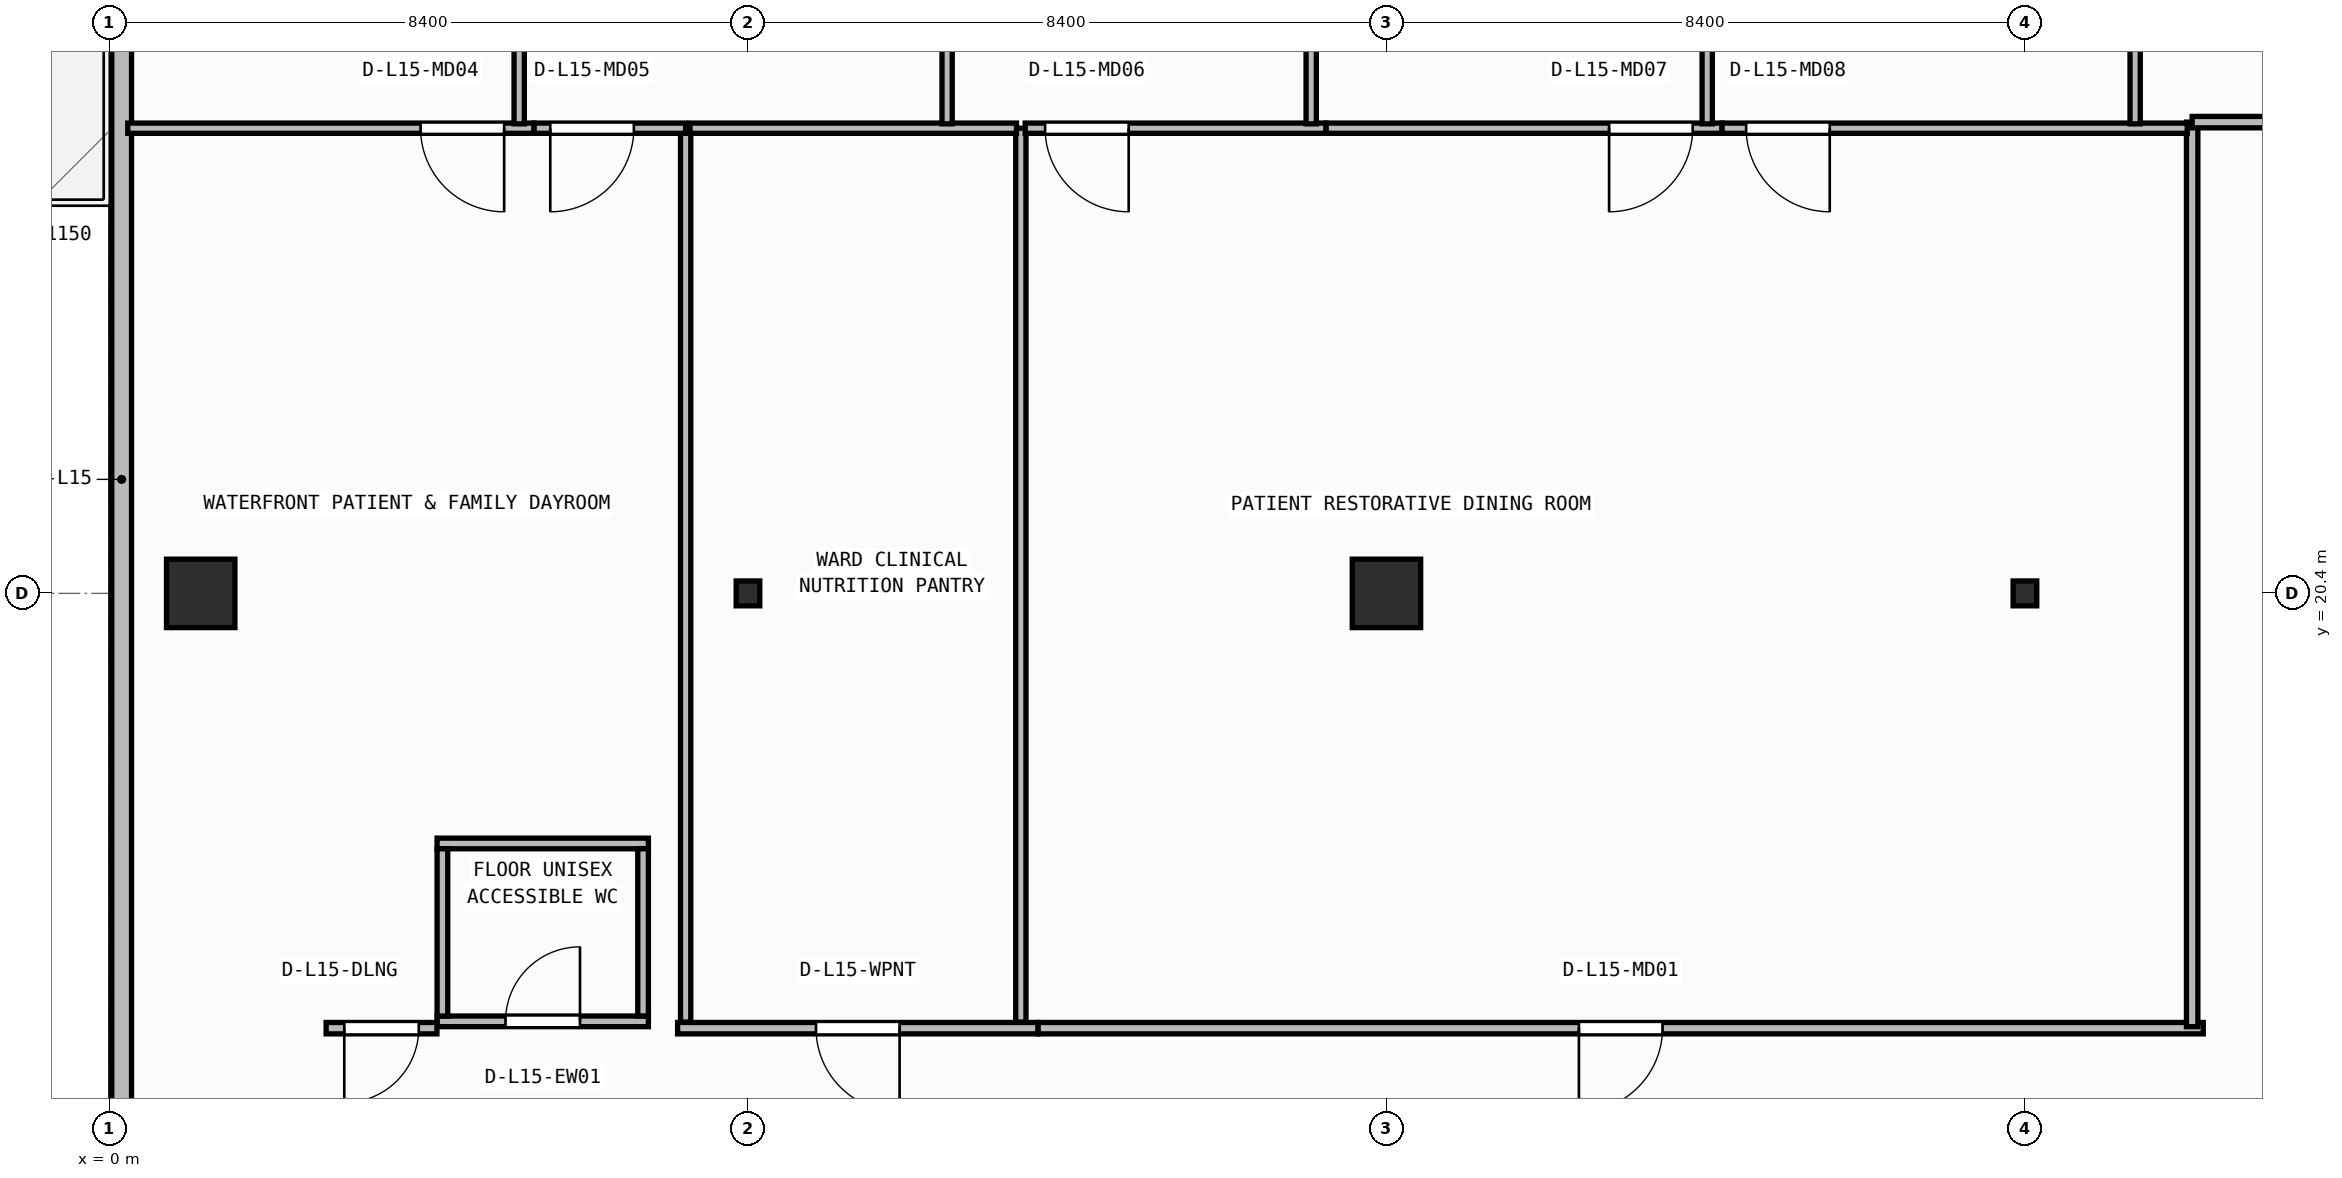
"""IFC4 building model, lengths in metres.
Left out: names, types, materials, properties, quantities, classifications, styles, units other than length and angle.
Written with IfcOpenShell. Run it as: python <this file> out.ifc"""

import sys

from ifc_helpers import new_model, si_unit, direction, frame, frame_2d, origin, origin_2d, place, context, subcontext, project, spatial, rectangle, i_section, extrude, element, fill, save


model = new_model("IFC4")
c1 = context("Model", 3, precision=1e-05, world=origin(), true_north=direction((0.0, 1.0)))
c2 = subcontext(c1, "Body", "Model", "MODEL_VIEW")
j1 = project(units=[si_unit("LENGTHUNIT", "METRE"), si_unit("PLANEANGLEUNIT", "RADIAN")], contexts=[c1])
p1 = place(None, origin())
s1 = spatial("IfcSite", under=j1, at=p1, CompositionType="ELEMENT")
p2 = place(p1, origin())
s2 = spatial("IfcBuilding", under=s1, at=p2, CompositionType="ELEMENT")
p3 = place(p2, frame((0.0, 0.0, 62.0)))
s3 = spatial("IfcBuildingStorey", under=s2, at=p3, CompositionType="ELEMENT", Elevation=62.0)
p4 = place(p3, frame((1.2, 20.4, 0.0), z_axis=(0.0, 0.0, 1.0), x_axis=(1.0, 0.0, 0.0)))
e1 = element("IfcColumn", 1, at=p4, inside=s3, PredefinedType="COLUMN", context=c2, shape_type="SweptSolid", body=[
    extrude(rectangle(XDim=0.9, YDim=0.9, at=origin_2d()), origin(), (0.0, 0.0, 1.0), 3.95),
])
p5 = place(p3, frame((8.4, 20.4, 0.0), z_axis=(0.0, 0.0, 1.0), x_axis=(1.0, 0.0, 0.0)))
e2 = element("IfcColumn", 2, at=p5, inside=s3, PredefinedType="COLUMN", context=c2, shape_type="SweptSolid", body=[
    extrude(i_section(OverallWidth=0.311, OverallDepth=0.327, WebThickness=0.016, FlangeThickness=0.025, FilletRadius=0.017, at=origin_2d()), origin(), (0.0, 0.0, 1.0), 3.95),
])
p6 = place(p3, frame((16.8, 20.4, 0.0), z_axis=(0.0, 0.0, 1.0), x_axis=(1.0, 0.0, 0.0)))
e3 = element("IfcColumn", 3, at=p6, inside=s3, PredefinedType="COLUMN", context=c2, shape_type="SweptSolid", body=[
    extrude(rectangle(XDim=0.9, YDim=0.9, at=origin_2d()), origin(), (0.0, 0.0, 1.0), 3.95),
])
p7 = place(p3, frame((25.2, 20.4, 0.0), z_axis=(0.0, 0.0, 1.0), x_axis=(1.0, 0.0, 0.0)))
e4 = element("IfcColumn", 4, at=p7, inside=s3, PredefinedType="COLUMN", context=c2, shape_type="SweptSolid", body=[
    extrude(i_section(OverallWidth=0.311, OverallDepth=0.327, WebThickness=0.016, FlangeThickness=0.025, FilletRadius=0.017, at=origin_2d()), origin(), (0.0, 0.0, 1.0), 3.95),
])
p8 = place(p3, frame((0.16, 41.04, 0.0), z_axis=(0.0, 0.0, 1.0), x_axis=(0.0, -1.0, 0.0)))
e5 = element("IfcWall", 5, at=p8, inside=s3, PredefinedType="STANDARD", context=c2, shape_type="SweptSolid", body=[
    extrude(rectangle(XDim=38.28, YDim=0.26, at=frame_2d((19.14, 0.0))), origin(), (0.0, 0.0, 1.0), 3.71),
])
p9 = place(p8, frame((6.793, 0.0, 0.0)))
e6 = element("IfcOpeningElement", 6, at=p9, cuts=e5, PredefinedType="OPENING", context=c2, shape_type="SweptSolid", body=[
    extrude(rectangle(XDim=1.3, YDim=2.15, at=frame_2d((0.65, 1.075))), frame((0.0, 0.14, 0.0), z_axis=(0.0, -1.0, 0.0), x_axis=(1.0, 0.0, 0.0)), (0.0, 0.0, 1.0), 0.28),
])
p10 = place(p3, frame((4.31, 14.77, 0.0), z_axis=(0.0, 0.0, 1.0), x_axis=(1.0, 0.0, 0.0)))
e7 = element("IfcWall", 7, at=p10, inside=s3, PredefinedType="PARTITIONING", context=c2, shape_type="SweptSolid", body=[
    extrude(rectangle(XDim=2.78, YDim=0.14, at=frame_2d((1.39, 0.0))), origin(), (0.0, 0.0, 1.0), 3.71),
])
p11 = place(p10, frame((0.9, 0.0, 0.0)))
e8 = element("IfcOpeningElement", 8, at=p11, cuts=e7, PredefinedType="OPENING", context=c2, shape_type="SweptSolid", body=[
    extrude(rectangle(XDim=0.98, YDim=2.1, at=frame_2d((0.49, 1.05))), frame((0.0, 0.08, 0.0), z_axis=(0.0, -1.0, 0.0), x_axis=(1.0, 0.0, 0.0)), (0.0, 0.0, 1.0), 0.16),
])
p12 = place(p3, frame((4.31, 17.11, 0.0), z_axis=(0.0, 0.0, 1.0), x_axis=(1.0, 0.0, 0.0)))
e9 = element("IfcWall", 9, at=p12, inside=s3, PredefinedType="PARTITIONING", context=c2, shape_type="SweptSolid", body=[
    extrude(rectangle(XDim=2.78, YDim=0.14, at=frame_2d((1.39, 0.0))), origin(), (0.0, 0.0, 1.0), 3.71),
])
for number, where, z_axis, x_axis in (
    (10, (4.38, 14.84, 0.0), (0.0, 0.0, 1.0), (0.0, 1.0, 0.0)),
    (11, (7.02, 14.84, 0.0), (0.0, 0.0, 1.0), (0.0, 1.0, 0.0)),
):
    element("IfcWall", number, at=place(p3, frame(where, z_axis=z_axis, x_axis=x_axis)), inside=s3, PredefinedType="PARTITIONING", context=c2, shape_type="SweptSolid", body=[
        extrude(rectangle(XDim=2.2, YDim=0.14, at=frame_2d((1.1, 0.0))), origin(), (0.0, 0.0, 1.0), 3.71),
    ])
p13 = place(p3, frame((4.308, 14.68, 0.0), z_axis=(0.0, 0.0, 1.0), x_axis=(-1.0, 0.0, 0.0)))
e12 = element("IfcWall", 12, at=p13, inside=s3, PredefinedType="PARTITIONING", context=c2, shape_type="SweptSolid", body=[
    extrude(rectangle(XDim=1.458, YDim=0.15, at=frame_2d((0.729, 0.0))), origin(), (0.0, 0.0, 1.0), 3.71),
])
p14 = place(p13, frame((0.239, 0.0, 0.0)))
e13 = element("IfcOpeningElement", 13, at=p14, cuts=e12, PredefinedType="OPENING", context=c2, shape_type="SweptSolid", body=[
    extrude(rectangle(XDim=0.98, YDim=2.1, at=frame_2d((0.49, 1.05))), frame((0.0, 0.085, 0.0), z_axis=(0.0, -1.0, 0.0), x_axis=(1.0, 0.0, 0.0)), (0.0, 0.0, 1.0), 0.17),
])
p15 = place(p3, frame((12.216, 14.68, 0.0), z_axis=(0.0, 0.0, 1.0), x_axis=(-1.0, 0.0, 0.0)))
e14 = element("IfcWall", 14, at=p15, inside=s3, PredefinedType="PARTITIONING", context=c2, shape_type="SweptSolid", body=[
    extrude(rectangle(XDim=4.742, YDim=0.15, at=frame_2d((2.371, 0.0))), origin(), (0.0, 0.0, 1.0), 3.71),
])
p16 = place(p15, frame((1.821, 0.0, 0.0)))
e15 = element("IfcOpeningElement", 15, at=p16, cuts=e14, PredefinedType="OPENING", context=c2, shape_type="SweptSolid", body=[
    extrude(rectangle(XDim=1.1, YDim=2.1, at=frame_2d((0.55, 1.05))), frame((0.0, 0.085, 0.0), z_axis=(0.0, -1.0, 0.0), x_axis=(1.0, 0.0, 0.0)), (0.0, 0.0, 1.0), 0.17),
])
p17 = place(p3, frame((27.546, 14.68, 0.0), z_axis=(0.0, 0.0, 1.0), x_axis=(-1.0, 0.0, 0.0)))
e16 = element("IfcWall", 16, at=p17, inside=s3, PredefinedType="PARTITIONING", context=c2, shape_type="SweptSolid", body=[
    extrude(rectangle(XDim=15.328, YDim=0.15, at=frame_2d((7.664, 0.0))), origin(), (0.0, 0.0, 1.0), 3.71),
])
p18 = place(p17, frame((7.114, 0.0, 0.0)))
e17 = element("IfcOpeningElement", 17, at=p18, cuts=e16, PredefinedType="OPENING", context=c2, shape_type="SweptSolid", body=[
    extrude(rectangle(XDim=1.1, YDim=2.1, at=frame_2d((0.55, 1.05))), frame((0.0, 0.085, 0.0), z_axis=(0.0, -1.0, 0.0), x_axis=(1.0, 0.0, 0.0)), (0.0, 0.0, 1.0), 0.17),
])
p19 = place(p3, frame((27.4, 26.6, 0.0), z_axis=(0.0, 0.0, 1.0), x_axis=(0.0, -1.0, 0.0)))
e18 = element("IfcWall", 18, at=p19, inside=s3, PredefinedType="PARTITIONING", context=c2, shape_type="SweptSolid", body=[
    extrude(rectangle(XDim=11.9, YDim=0.15, at=frame_2d((5.95, 0.0))), origin(), (0.0, 0.0, 1.0), 3.71),
])
p20 = place(p3, frame((29.9, 26.6, 0.0), z_axis=(0.0, 0.0, 1.0), x_axis=(-1.0, 0.0, 0.0)))
e19 = element("IfcWall", 19, at=p20, inside=s3, PredefinedType="PARTITIONING", context=c2, shape_type="SweptSolid", body=[
    extrude(rectangle(XDim=2.5, YDim=0.15, at=frame_2d((1.25, 0.0))), origin(), (0.0, 0.0, 1.0), 3.71),
])
p21 = place(p20, frame((0.225, 0.0, 0.0)))
e20 = element("IfcOpeningElement", 20, at=p21, cuts=e19, PredefinedType="OPENING", context=c2, shape_type="SweptSolid", body=[
    extrude(rectangle(XDim=1.1, YDim=2.1, at=frame_2d((0.55, 1.05))), frame((0.0, 0.085, 0.0), z_axis=(0.0, -1.0, 0.0), x_axis=(1.0, 0.0, 0.0)), (0.0, 0.0, 1.0), 0.17),
])
p22 = place(p3, frame((7.58, 14.76, 0.0), z_axis=(0.0, 0.0, 1.0), x_axis=(0.0, 1.0, 0.0)))
e21 = element("IfcWall", 21, at=p22, inside=s3, PredefinedType="PARTITIONING", context=c2, shape_type="SweptSolid", body=[
    extrude(rectangle(XDim=11.76, YDim=0.135, at=frame_2d((5.88, 0.0))), origin(), (0.0, 0.0, 1.0), 3.71),
])
p23 = place(p3, frame((5.585, 26.52, 0.0), z_axis=(0.0, 0.0, 1.0), x_axis=(-1.0, 0.0, 0.0)))
e22 = element("IfcWall", 22, at=p23, inside=s3, PredefinedType="PARTITIONING", context=c2, shape_type="SweptSolid", body=[
    extrude(rectangle(XDim=5.345, YDim=0.135, at=frame_2d((2.672, 0.0))), origin(), (0.0, 0.0, 1.0), 3.71),
])
p24 = place(p23, frame((0.392, 0.0, 0.0)))
e23 = element("IfcOpeningElement", 23, at=p24, cuts=e22, PredefinedType="OPENING", context=c2, shape_type="SweptSolid", body=[
    extrude(rectangle(XDim=1.1, YDim=2.1, at=frame_2d((0.55, 1.05))), frame((0.0, 0.077, 0.0), z_axis=(0.0, -1.0, 0.0), x_axis=(1.0, 0.0, 0.0)), (0.0, 0.0, 1.0), 0.155),
])
p25 = place(p3, frame((7.58, 26.52, 0.0), z_axis=(0.0, 0.0, 1.0), x_axis=(-1.0, 0.0, 0.0)))
e24 = element("IfcWall", 24, at=p25, inside=s3, PredefinedType="PARTITIONING", context=c2, shape_type="SweptSolid", body=[
    extrude(rectangle(XDim=1.993, YDim=0.135, at=frame_2d((0.997, 0.0))), origin(), (0.0, 0.0, 1.0), 3.71),
])
p26 = place(p25, frame((0.681, 0.0, 0.0)))
e25 = element("IfcOpeningElement", 25, at=p26, cuts=e24, PredefinedType="OPENING", context=c2, shape_type="SweptSolid", body=[
    extrude(rectangle(XDim=1.1, YDim=2.1, at=frame_2d((0.55, 1.05))), frame((0.0, 0.077, 0.0), z_axis=(0.0, -1.0, 0.0), x_axis=(1.0, 0.0, 0.0)), (0.0, 0.0, 1.0), 0.155),
])
p27 = place(p3, frame((11.99, 14.76, 0.0), z_axis=(0.0, 0.0, 1.0), x_axis=(0.0, 1.0, 0.0)))
e26 = element("IfcWall", 26, at=p27, inside=s3, PredefinedType="PARTITIONING", context=c2, shape_type="SweptSolid", body=[
    extrude(rectangle(XDim=11.76, YDim=0.135, at=frame_2d((5.88, 0.0))), origin(), (0.0, 0.0, 1.0), 3.71),
])
p28 = place(p3, frame((11.933, 26.52, 0.0), z_axis=(0.0, 0.0, 1.0), x_axis=(-1.0, 0.0, 0.0)))
e27 = element("IfcWall", 27, at=p28, inside=s3, PredefinedType="PARTITIONING", context=c2, shape_type="SweptSolid", body=[
    extrude(rectangle(XDim=4.295, YDim=0.135, at=frame_2d((2.147, 0.0))), origin(), (0.0, 0.0, 1.0), 3.71),
])
p29 = place(p3, frame((16.005, 26.52, 0.0), z_axis=(0.0, 0.0, 1.0), x_axis=(-1.0, 0.0, 0.0)))
e28 = element("IfcWall", 28, at=p29, inside=s3, PredefinedType="PARTITIONING", context=c2, shape_type="SweptSolid", body=[
    extrude(rectangle(XDim=3.957, YDim=0.135, at=frame_2d((1.979, 0.0))), origin(), (0.0, 0.0, 1.0), 3.71),
])
p30 = place(p29, frame((2.596, 0.0, 0.0)))
e29 = element("IfcOpeningElement", 29, at=p30, cuts=e28, PredefinedType="OPENING", context=c2, shape_type="SweptSolid", body=[
    extrude(rectangle(XDim=1.1, YDim=2.1, at=frame_2d((0.55, 1.05))), frame((0.0, 0.077, 0.0), z_axis=(0.0, -1.0, 0.0), x_axis=(1.0, 0.0, 0.0)), (0.0, 0.0, 1.0), 0.155),
])
p31 = place(p3, frame((21.215, 26.52, 0.0), z_axis=(0.0, 0.0, 1.0), x_axis=(-1.0, 0.0, 0.0)))
e30 = element("IfcWall", 30, at=p31, inside=s3, PredefinedType="PARTITIONING", context=c2, shape_type="SweptSolid", body=[
    extrude(rectangle(XDim=5.208, YDim=0.135, at=frame_2d((2.604, 0.0))), origin(), (0.0, 0.0, 1.0), 3.71),
])
p32 = place(p31, frame((0.385, 0.0, 0.0)))
e31 = element("IfcOpeningElement", 31, at=p32, cuts=e30, PredefinedType="OPENING", context=c2, shape_type="SweptSolid", body=[
    extrude(rectangle(XDim=1.1, YDim=2.1, at=frame_2d((0.55, 1.05))), frame((0.0, 0.077, 0.0), z_axis=(0.0, -1.0, 0.0), x_axis=(1.0, 0.0, 0.0)), (0.0, 0.0, 1.0), 0.155),
])
p33 = place(p3, frame((27.335, 26.52, 0.0), z_axis=(0.0, 0.0, 1.0), x_axis=(-1.0, 0.0, 0.0)))
e32 = element("IfcWall", 32, at=p33, inside=s3, PredefinedType="PARTITIONING", context=c2, shape_type="SweptSolid", body=[
    extrude(rectangle(XDim=6.118, YDim=0.135, at=frame_2d((3.059, 0.0))), origin(), (0.0, 0.0, 1.0), 3.71),
])
p34 = place(p33, frame((4.703, 0.0, 0.0)))
e33 = element("IfcOpeningElement", 33, at=p34, cuts=e32, PredefinedType="OPENING", context=c2, shape_type="SweptSolid", body=[
    extrude(rectangle(XDim=1.1, YDim=2.1, at=frame_2d((0.55, 1.05))), frame((0.0, 0.077, 0.0), z_axis=(0.0, -1.0, 0.0), x_axis=(1.0, 0.0, 0.0)), (0.0, 0.0, 1.0), 0.155),
])
p35 = place(p3, frame((5.39, 26.577, 0.0), z_axis=(0.0, 0.0, 1.0), x_axis=(0.0, 1.0, 0.0)))
e34 = element("IfcWall", 34, at=p35, inside=s3, PredefinedType="PARTITIONING", context=c2, shape_type="SweptSolid", body=[
    extrude(rectangle(XDim=15.133, YDim=0.135, at=frame_2d((7.566, 0.0))), origin(), (0.0, 0.0, 1.0), 3.71),
])
p36 = place(p3, frame((11.02, 26.577, 0.0), z_axis=(0.0, 0.0, 1.0), x_axis=(0.0, 1.0, 0.0)))
e35 = element("IfcWall", 35, at=p36, inside=s3, PredefinedType="PARTITIONING", context=c2, shape_type="SweptSolid", body=[
    extrude(rectangle(XDim=11.306, YDim=0.135, at=frame_2d((5.653, 0.0))), origin(), (0.0, 0.0, 1.0), 3.71),
])
p37 = place(p3, frame((15.81, 26.577, 0.0), z_axis=(0.0, 0.0, 1.0), x_axis=(0.0, 1.0, 0.0)))
e36 = element("IfcWall", 36, at=p37, inside=s3, PredefinedType="PARTITIONING", context=c2, shape_type="SweptSolid", body=[
    extrude(rectangle(XDim=8.947, YDim=0.135, at=frame_2d((4.473, 0.0))), origin(), (0.0, 0.0, 1.0), 3.71),
])
p38 = place(p3, frame((21.02, 26.577, 0.0), z_axis=(0.0, 0.0, 1.0), x_axis=(0.0, 1.0, 0.0)))
e37 = element("IfcWall", 37, at=p38, inside=s3, PredefinedType="PARTITIONING", context=c2, shape_type="SweptSolid", body=[
    extrude(rectangle(XDim=6.503, YDim=0.135, at=frame_2d((3.252, 0.0))), origin(), (0.0, 0.0, 1.0), 3.71),
])
p39 = place(p3, frame((26.65, 26.577, 0.0), z_axis=(0.0, 0.0, 1.0), x_axis=(0.0, 1.0, 0.0)))
e38 = element("IfcWall", 38, at=p39, inside=s3, PredefinedType="PARTITIONING", context=c2, shape_type="SweptSolid", body=[
    extrude(rectangle(XDim=4.893, YDim=0.135, at=frame_2d((2.447, 0.0))), origin(), (0.0, 0.0, 1.0), 3.71),
])
p40 = place(p11, origin())
e39 = element("IfcDoor", 39, at=p40, inside=s3, OperationType="SINGLE_SWING_RIGHT", PredefinedType="DOOR", context=c2, shape_type="SweptSolid", body=[
    extrude(rectangle(XDim=0.98, YDim=2.1, at=frame_2d((0.49, 1.05))), frame((0.0, 0.025, 0.0), z_axis=(0.0, -1.0, 0.0), x_axis=(1.0, 0.0, 0.0)), (0.0, 0.0, 1.0), 0.05),
])
fill(e8, e39)
p41 = place(p14, origin())
e40 = element("IfcDoor", 40, at=p41, inside=s3, OperationType="SINGLE_SWING_RIGHT", PredefinedType="DOOR", context=c2, shape_type="SweptSolid", body=[
    extrude(rectangle(XDim=0.98, YDim=2.1, at=frame_2d((0.49, 1.05))), frame((0.0, 0.025, 0.0), z_axis=(0.0, -1.0, 0.0), x_axis=(1.0, 0.0, 0.0)), (0.0, 0.0, 1.0), 0.05),
])
fill(e13, e40)
p42 = place(p16, origin())
e41 = element("IfcDoor", 41, at=p42, inside=s3, OperationType="SINGLE_SWING_LEFT", PredefinedType="DOOR", context=c2, shape_type="SweptSolid", body=[
    extrude(rectangle(XDim=1.1, YDim=2.1, at=frame_2d((0.55, 1.05))), frame((0.0, 0.025, 0.0), z_axis=(0.0, -1.0, 0.0), x_axis=(1.0, 0.0, 0.0)), (0.0, 0.0, 1.0), 0.05),
])
fill(e15, e41)
p43 = place(p18, origin())
e42 = element("IfcDoor", 42, at=p43, inside=s3, OperationType="SINGLE_SWING_RIGHT", PredefinedType="DOOR", context=c2, shape_type="SweptSolid", body=[
    extrude(rectangle(XDim=1.1, YDim=2.1, at=frame_2d((0.55, 1.05))), frame((0.0, 0.025, 0.0), z_axis=(0.0, -1.0, 0.0), x_axis=(1.0, 0.0, 0.0)), (0.0, 0.0, 1.0), 0.05),
])
fill(e17, e42)
p44 = place(p24, origin())
e43 = element("IfcDoor", 43, at=p44, inside=s3, OperationType="SINGLE_SWING_LEFT", PredefinedType="DOOR", context=c2, shape_type="SweptSolid", body=[
    extrude(rectangle(XDim=1.1, YDim=2.1, at=frame_2d((0.55, 1.05))), frame((0.0, 0.025, 0.0), z_axis=(0.0, -1.0, 0.0), x_axis=(1.0, 0.0, 0.0)), (0.0, 0.0, 1.0), 0.05),
])
fill(e23, e43)
p45 = place(p26, origin())
e44 = element("IfcDoor", 44, at=p45, inside=s3, OperationType="SINGLE_SWING_RIGHT", PredefinedType="DOOR", context=c2, shape_type="SweptSolid", body=[
    extrude(rectangle(XDim=1.1, YDim=2.1, at=frame_2d((0.55, 1.05))), frame((0.0, 0.025, 0.0), z_axis=(0.0, -1.0, 0.0), x_axis=(1.0, 0.0, 0.0)), (0.0, 0.0, 1.0), 0.05),
])
fill(e25, e44)
p46 = place(p30, origin())
e45 = element("IfcDoor", 45, at=p46, inside=s3, OperationType="SINGLE_SWING_LEFT", PredefinedType="DOOR", context=c2, shape_type="SweptSolid", body=[
    extrude(rectangle(XDim=1.1, YDim=2.1, at=frame_2d((0.55, 1.05))), frame((0.0, 0.025, 0.0), z_axis=(0.0, -1.0, 0.0), x_axis=(1.0, 0.0, 0.0)), (0.0, 0.0, 1.0), 0.05),
])
fill(e29, e45)
p47 = place(p32, origin())
e46 = element("IfcDoor", 46, at=p47, inside=s3, OperationType="SINGLE_SWING_RIGHT", PredefinedType="DOOR", context=c2, shape_type="SweptSolid", body=[
    extrude(rectangle(XDim=1.1, YDim=2.1, at=frame_2d((0.55, 1.05))), frame((0.0, 0.025, 0.0), z_axis=(0.0, -1.0, 0.0), x_axis=(1.0, 0.0, 0.0)), (0.0, 0.0, 1.0), 0.05),
])
fill(e31, e46)
p48 = place(p34, origin())
e47 = element("IfcDoor", 47, at=p48, inside=s3, OperationType="SINGLE_SWING_LEFT", PredefinedType="DOOR", context=c2, shape_type="SweptSolid", body=[
    extrude(rectangle(XDim=1.1, YDim=2.1, at=frame_2d((0.55, 1.05))), frame((0.0, 0.025, 0.0), z_axis=(0.0, -1.0, 0.0), x_axis=(1.0, 0.0, 0.0)), (0.0, 0.0, 1.0), 0.05),
])
fill(e33, e47)
save(model, sys.argv[1])
